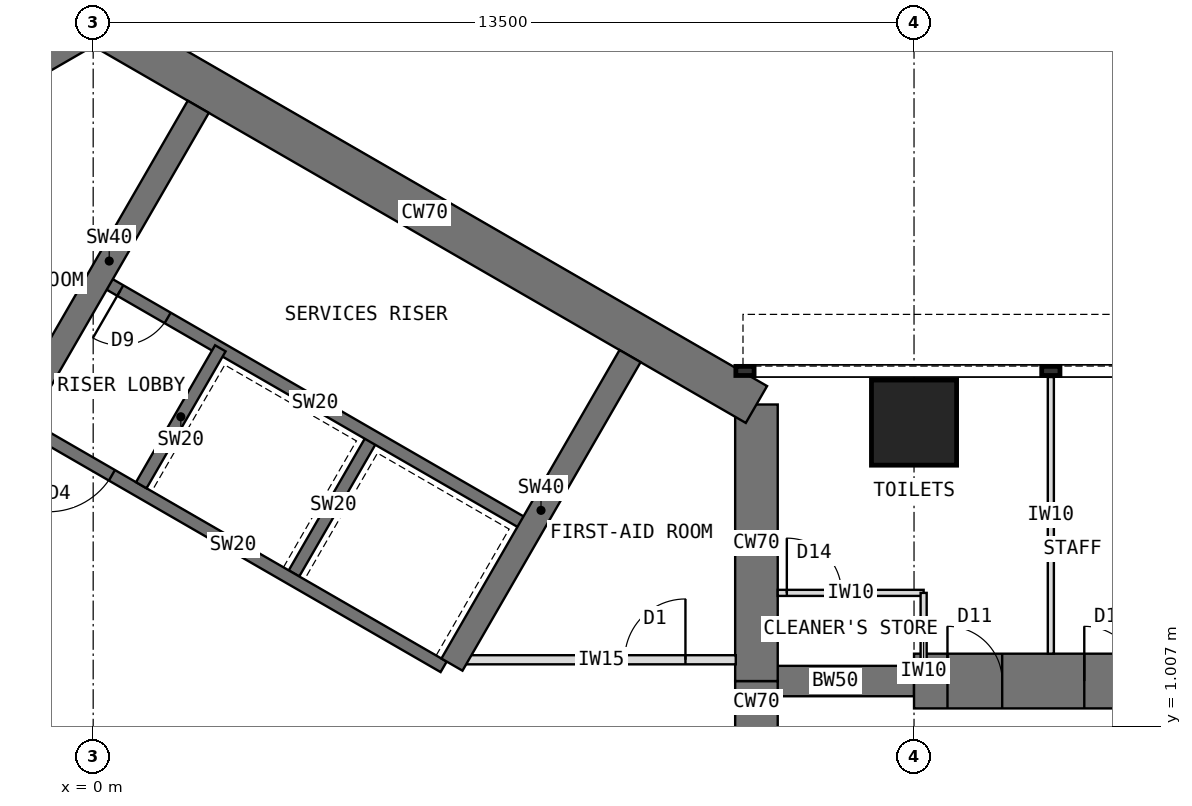
"""IFC4 building model, lengths in metres.
Left out: names, types, materials, properties, quantities, classifications, styles, units other than length and angle.
Written with IfcOpenShell. Run it as: python <this file> out.ifc"""

import sys

from ifc_helpers import new_model, si_unit, direction, frame, frame_2d, origin, origin_2d, place, context, subcontext, project, spatial, rectangle, extrude, element, fill, save


model = new_model("IFC4")
c1 = context("Model", 3, precision=1e-05, world=origin(), true_north=direction((0.0, 1.0)))
c2 = subcontext(c1, "Body", "Model", "MODEL_VIEW")
j1 = project(units=[si_unit("LENGTHUNIT", "METRE"), si_unit("PLANEANGLEUNIT", "RADIAN")], contexts=[c1])
p1 = place(None, origin())
s1 = spatial("IfcSite", under=j1, at=p1, CompositionType="ELEMENT")
p2 = place(p1, origin())
s2 = spatial("IfcBuilding", under=s1, at=p2, CompositionType="ELEMENT")
p3 = place(p2, frame((0.0, 0.0, 84.5)))
s3 = spatial("IfcBuildingStorey", under=s2, at=p3, CompositionType="ELEMENT", Elevation=84.5)
p4 = place(p3, frame((10.908, -1.75, 0.0), z_axis=(0.0, 0.0, 1.0), x_axis=(0.0, 1.0, 0.0)))
e1 = element("IfcWall", 1, at=p4, inside=s3, PredefinedType="SHEAR", context=c2, shape_type="SweptSolid", body=[
    extrude(rectangle(XDim=3.5, YDim=0.7, at=frame_2d((1.75, 0.0))), origin(), (0.0, 0.0, 1.0), 4.0),
])
p5 = place(p4, frame((0.85, 0.0, 0.0)))
e2 = element("IfcOpeningElement", 2, at=p5, cuts=e1, PredefinedType="OPENING", context=c2, shape_type="SweptSolid", body=[
    extrude(rectangle(XDim=1.8, YDim=2.1, at=frame_2d((0.9, 1.05))), frame((0.0, 0.36, 0.0), z_axis=(0.0, -1.0, 0.0), x_axis=(1.0, 0.0, 0.0)), (0.0, 0.0, 1.0), 0.72),
])
p6 = place(p3, frame((10.908, 1.75, 0.0), z_axis=(0.0, 0.0, 1.0), x_axis=(0.0, 1.0, 0.0)))
e3 = element("IfcWall", 3, at=p6, inside=s3, PredefinedType="SHEAR", context=c2, shape_type="SweptSolid", body=[
    extrude(rectangle(XDim=4.548, YDim=0.7, at=frame_2d((2.274, 0.0))), origin(), (0.0, 0.0, 1.0), 4.0),
])
p7 = place(p3, frame((10.908, 6.298, 0.0), z_axis=(0.0, 0.0, 1.0), x_axis=(-0.866021940709, 0.500005998175, 0.0)))
e4 = element("IfcWall", 4, at=p7, inside=s3, PredefinedType="SHEAR", context=c2, shape_type="SweptSolid", body=[
    extrude(rectangle(XDim=12.596, YDim=0.7, at=frame_2d((6.298, 0.0))), origin(), (0.0, 0.0, 1.0), 4.0),
])
p8 = place(p3, frame((0.0, 12.596, 0.0), z_axis=(0.0, 0.0, 1.0), x_axis=(-0.866011268655, -0.500024481964, 0.0)))
e5 = element("IfcWall", 5, at=p8, inside=s3, PredefinedType="SHEAR", context=c2, shape_type="SweptSolid", body=[
    extrude(rectangle(XDim=4.548, YDim=0.7, at=frame_2d((2.274, 0.0))), origin(), (0.0, 0.0, 1.0), 4.0),
])
p9 = place(p3, frame((10.908, 1.75, 0.0), z_axis=(0.0, 0.0, 1.0), x_axis=(1.0, 0.0, 0.0)))
e6 = element("IfcWall", 6, at=p9, inside=s3, PredefinedType="SHEAR", context=c2, shape_type="SweptSolid", body=[
    extrude(rectangle(XDim=2.592, YDim=0.5, at=frame_2d((1.296, 0.0))), origin(), (0.0, 0.0, 1.0), 4.0),
])
p10 = place(p3, frame((13.5, 1.75, 0.0), z_axis=(0.0, 0.0, 1.0), x_axis=(1.0, 0.0, 0.0)))
e7 = element("IfcWall", 7, at=p10, inside=s3, PredefinedType="SHEAR", context=c2, shape_type="SweptSolid", body=[
    extrude(rectangle(XDim=13.2, YDim=0.9, at=frame_2d((6.6, 0.0))), origin(), (0.0, 0.0, 1.0), 4.0),
])
p11 = place(p10, frame((0.55, 0.0, 0.0)))
e8 = element("IfcOpeningElement", 8, at=p11, cuts=e7, PredefinedType="OPENING", context=c2, shape_type="SweptSolid", body=[
    extrude(rectangle(XDim=0.9, YDim=2.1, at=frame_2d((0.45, 1.05))), frame((0.0, 0.46, 0.0), z_axis=(0.0, -1.0, 0.0), x_axis=(1.0, 0.0, 0.0)), (0.0, 0.0, 1.0), 0.92),
])
p12 = place(p10, frame((2.8, 0.0, 0.0)))
e9 = element("IfcOpeningElement", 9, at=p12, cuts=e7, PredefinedType="OPENING", context=c2, shape_type="SweptSolid", body=[
    extrude(rectangle(XDim=0.9, YDim=2.1, at=frame_2d((0.45, 1.05))), frame((0.0, 0.46, 0.0), z_axis=(0.0, -1.0, 0.0), x_axis=(1.0, 0.0, 0.0)), (0.0, 0.0, 1.0), 0.92),
])
p13 = place(p10, frame((7.3, 0.0, 0.0)))
e10 = element("IfcOpeningElement", 10, at=p13, cuts=e7, PredefinedType="OPENING", context=c2, shape_type="SweptSolid", body=[
    extrude(rectangle(XDim=0.9, YDim=2.1, at=frame_2d((0.45, 1.05))), frame((0.0, 0.46, 0.0), z_axis=(0.0, -1.0, 0.0), x_axis=(1.0, 0.0, 0.0)), (0.0, 0.0, 1.0), 0.92),
])
p14 = place(p3, frame((13.5, 6.0, 0.0), z_axis=(0.0, 0.0, 1.0), x_axis=(1.0, 0.0, 0.0)))
e11 = element("IfcColumn", 11, at=p14, inside=s3, PredefinedType="COLUMN", context=c2, shape_type="SweptSolid", body=[
    extrude(rectangle(XDim=1.4, YDim=1.4, at=origin_2d()), origin(), (0.0, 0.0, 1.0), 4.0),
])
p15 = place(p3, frame((5.764, 1.984, 0.0), z_axis=(0.0, 0.0, 1.0), x_axis=(-0.866026010844, 0.49999894854, 0.0)))
e12 = element("IfcWall", 12, at=p15, inside=s3, PredefinedType="SHEAR", context=c2, shape_type="SweptSolid", body=[
    extrude(rectangle(XDim=8.0, YDim=0.2, at=frame_2d((4.0, 0.0))), origin(), (0.0, 0.0, 1.0), 4.0),
])
p16 = place(p15, frame((6.3, 0.0, 0.0)))
e13 = element("IfcOpeningElement", 13, at=p16, cuts=e12, PredefinedType="OPENING", context=c2, shape_type="SweptSolid", body=[
    extrude(rectangle(XDim=1.2, YDim=2.1, at=frame_2d((0.6, 1.05))), frame((0.0, 0.11, 0.0), z_axis=(0.0, -1.0, 0.0), x_axis=(1.0, 0.0, 0.0)), (0.0, 0.0, 1.0), 0.22),
])
for number, where, z_axis, x_axis in (
    (14, (3.303, 3.52, 0.0), (0.0, 0.0, 1.0), (0.5, 0.866, 0.0)),
    (15, (0.791, 4.97, 0.0), (0.0, 0.0, 1.0), (0.5, 0.866, 0.0)),
):
    element("IfcWall", number, at=place(p3, frame(where, z_axis=z_axis, x_axis=x_axis)), inside=s3, PredefinedType="SHEAR", context=c2, shape_type="SweptSolid", body=[
        extrude(rectangle(XDim=2.6, YDim=0.2, at=frame_2d((1.3, 0.0))), origin(), (0.0, 0.0, 1.0), 4.0),
    ])
p17 = place(p3, frame((7.114, 4.322, 0.0), z_axis=(0.0, 0.0, 1.0), x_axis=(-0.866026010844, 0.49999894854, 0.0)))
e16 = element("IfcWall", 16, at=p17, inside=s3, PredefinedType="SHEAR", context=c2, shape_type="SweptSolid", body=[
    extrude(rectangle(XDim=8.0, YDim=0.2, at=frame_2d((4.0, 0.0))), origin(), (0.0, 0.0, 1.0), 4.0),
])
p18 = place(p17, frame((6.8, 0.0, 0.0)))
e17 = element("IfcOpeningElement", 17, at=p18, cuts=e16, PredefinedType="OPENING", context=c2, shape_type="SweptSolid", body=[
    extrude(rectangle(XDim=0.9, YDim=2.1, at=frame_2d((0.45, 1.05))), frame((0.0, 0.11, 0.0), z_axis=(0.0, -1.0, 0.0), x_axis=(1.0, 0.0, 0.0)), (0.0, 0.0, 1.0), 0.22),
])
for number, where, z_axis, x_axis in (
    (18, (-1.201, 6.12, 0.0), (0.0, 0.0, 1.0), (0.5, 0.866, 0.0)),
    (19, (5.901, 2.02, 0.0), (0.0, 0.0, 1.0), (0.5, 0.866, 0.0)),
):
    element("IfcWall", number, at=place(p3, frame(where, z_axis=z_axis, x_axis=x_axis)), inside=s3, PredefinedType="SHEAR", context=c2, shape_type="SweptSolid", body=[
        extrude(rectangle(XDim=5.858, YDim=0.4, at=frame_2d((2.929, 0.0))), origin(), (0.0, 0.0, 1.0), 4.0),
    ])
p19 = place(p3, frame((15.75, 2.2, 0.0), z_axis=(0.0, 0.0, 1.0), x_axis=(0.0, 1.0, 0.0)))
e20 = element("IfcWall", 20, at=p19, inside=s3, PredefinedType="PARTITIONING", context=c2, shape_type="SweptSolid", body=[
    extrude(rectangle(XDim=4.55, YDim=0.1, at=frame_2d((2.275, 0.0))), origin(), (0.0, 0.0, 1.0), 3.8),
])
p20 = place(p3, frame((11.258, 3.2, 0.0), z_axis=(0.0, 0.0, 1.0), x_axis=(1.0, 0.0, 0.0)))
e21 = element("IfcWall", 21, at=p20, inside=s3, PredefinedType="PARTITIONING", context=c2, shape_type="SweptSolid", body=[
    extrude(rectangle(XDim=2.4, YDim=0.1, at=frame_2d((1.2, 0.0))), origin(), (0.0, 0.0, 1.0), 3.8),
])
p21 = place(p20, frame((0.15, 0.0, 0.0)))
e22 = element("IfcOpeningElement", 22, at=p21, cuts=e21, PredefinedType="OPENING", context=c2, shape_type="SweptSolid", body=[
    extrude(rectangle(XDim=0.9, YDim=2.1, at=frame_2d((0.45, 1.05))), frame((0.0, 0.06, 0.0), z_axis=(0.0, -1.0, 0.0), x_axis=(1.0, 0.0, 0.0)), (0.0, 0.0, 1.0), 0.12),
])
p22 = place(p3, frame((13.658, 2.0, 0.0), z_axis=(0.0, 0.0, 1.0), x_axis=(0.0, 1.0, 0.0)))
e23 = element("IfcWall", 23, at=p22, inside=s3, PredefinedType="PARTITIONING", context=c2, shape_type="SweptSolid", body=[
    extrude(rectangle(XDim=1.2, YDim=0.1, at=frame_2d((0.6, 0.0))), origin(), (0.0, 0.0, 1.0), 3.8),
])
p23 = place(p3, frame((6.143, 2.1, 0.0), z_axis=(0.0, 0.0, 1.0), x_axis=(1.0, 0.0, 0.0)))
e24 = element("IfcWall", 24, at=p23, inside=s3, PredefinedType="PARTITIONING", context=c2, shape_type="SweptSolid", body=[
    extrude(rectangle(XDim=4.426, YDim=0.15, at=frame_2d((2.213, 0.0))), origin(), (0.0, 0.0, 1.0), 3.8),
])
p24 = place(p23, frame((2.598, 0.0, 0.0)))
e25 = element("IfcOpeningElement", 25, at=p24, cuts=e24, PredefinedType="OPENING", context=c2, shape_type="SweptSolid", body=[
    extrude(rectangle(XDim=1.0, YDim=2.1, at=frame_2d((0.5, 1.05))), frame((0.0, 0.085, 0.0), z_axis=(0.0, -1.0, 0.0), x_axis=(1.0, 0.0, 0.0)), (0.0, 0.0, 1.0), 0.17),
])
p25 = place(p16, origin())
e26 = element("IfcDoor", 26, at=p25, inside=s3, OperationType="SINGLE_SWING_RIGHT", PredefinedType="DOOR", context=c2, shape_type="SweptSolid", body=[
    extrude(rectangle(XDim=1.2, YDim=2.1, at=frame_2d((0.6, 1.05))), frame((0.0, 0.025, 0.0), z_axis=(0.0, -1.0, 0.0), x_axis=(1.0, 0.0, 0.0)), (0.0, 0.0, 1.0), 0.05),
])
fill(e13, e26)
p26 = place(p18, origin())
e27 = element("IfcDoor", 27, at=p26, inside=s3, OperationType="SINGLE_SWING_RIGHT", PredefinedType="DOOR", context=c2, shape_type="SweptSolid", body=[
    extrude(rectangle(XDim=0.9, YDim=2.1, at=frame_2d((0.45, 1.05))), frame((0.0, 0.025, 0.0), z_axis=(0.0, -1.0, 0.0), x_axis=(1.0, 0.0, 0.0)), (0.0, 0.0, 1.0), 0.05),
])
fill(e17, e27)
p27 = place(p21, origin())
e28 = element("IfcDoor", 28, at=p27, inside=s3, OperationType="SINGLE_SWING_LEFT", PredefinedType="DOOR", context=c2, shape_type="SweptSolid", body=[
    extrude(rectangle(XDim=0.9, YDim=2.1, at=frame_2d((0.45, 1.05))), frame((0.0, 0.025, 0.0), z_axis=(0.0, -1.0, 0.0), x_axis=(1.0, 0.0, 0.0)), (0.0, 0.0, 1.0), 0.05),
])
fill(e22, e28)
p28 = place(p24, origin())
e29 = element("IfcDoor", 29, at=p28, inside=s3, OperationType="SINGLE_SWING_RIGHT", PredefinedType="DOOR", context=c2, shape_type="SweptSolid", body=[
    extrude(rectangle(XDim=1.0, YDim=2.1, at=frame_2d((0.5, 1.05))), frame((0.0, 0.025, 0.0), z_axis=(0.0, -1.0, 0.0), x_axis=(1.0, 0.0, 0.0)), (0.0, 0.0, 1.0), 0.05),
])
fill(e25, e29)
p29 = place(p11, origin())
e30 = element("IfcDoor", 30, at=p29, inside=s3, OperationType="SINGLE_SWING_LEFT", PredefinedType="DOOR", context=c2, shape_type="SweptSolid", body=[
    extrude(rectangle(XDim=0.82, YDim=2.06, at=frame_2d((0.45, 1.03))), frame((0.0, 0.025, 0.0), z_axis=(0.0, -1.0, 0.0), x_axis=(1.0, 0.0, 0.0)), (0.0, 0.0, 1.0), 0.05),
    extrude(rectangle(XDim=0.04, YDim=2.1, at=frame_2d((0.02, 1.05))), frame((0.0, 0.45, 0.0), z_axis=(0.0, -1.0, 0.0), x_axis=(1.0, 0.0, 0.0)), (0.0, 0.0, 1.0), 0.899),
    extrude(rectangle(XDim=0.04, YDim=2.1, at=frame_2d((0.88, 1.05))), frame((0.0, 0.45, 0.0), z_axis=(0.0, -1.0, 0.0), x_axis=(1.0, 0.0, 0.0)), (0.0, 0.0, 1.0), 0.899),
    extrude(rectangle(XDim=0.82, YDim=0.04, at=frame_2d((0.45, 2.08))), frame((0.0, 0.45, 0.0), z_axis=(0.0, -1.0, 0.0), x_axis=(1.0, 0.0, 0.0)), (0.0, 0.0, 1.0), 0.899),
])
fill(e8, e30)
p30 = place(p12, origin())
e31 = element("IfcDoor", 31, at=p30, inside=s3, OperationType="SINGLE_SWING_LEFT", PredefinedType="DOOR", context=c2, shape_type="SweptSolid", body=[
    extrude(rectangle(XDim=0.82, YDim=2.06, at=frame_2d((0.45, 1.03))), frame((0.0, 0.025, 0.0), z_axis=(0.0, -1.0, 0.0), x_axis=(1.0, 0.0, 0.0)), (0.0, 0.0, 1.0), 0.05),
    extrude(rectangle(XDim=0.04, YDim=2.1, at=frame_2d((0.02, 1.05))), frame((0.0, 0.45, 0.0), z_axis=(0.0, -1.0, 0.0), x_axis=(1.0, 0.0, 0.0)), (0.0, 0.0, 1.0), 0.899),
    extrude(rectangle(XDim=0.04, YDim=2.1, at=frame_2d((0.88, 1.05))), frame((0.0, 0.45, 0.0), z_axis=(0.0, -1.0, 0.0), x_axis=(1.0, 0.0, 0.0)), (0.0, 0.0, 1.0), 0.899),
    extrude(rectangle(XDim=0.82, YDim=0.04, at=frame_2d((0.45, 2.08))), frame((0.0, 0.45, 0.0), z_axis=(0.0, -1.0, 0.0), x_axis=(1.0, 0.0, 0.0)), (0.0, 0.0, 1.0), 0.899),
])
fill(e9, e31)
save(model, sys.argv[1])
